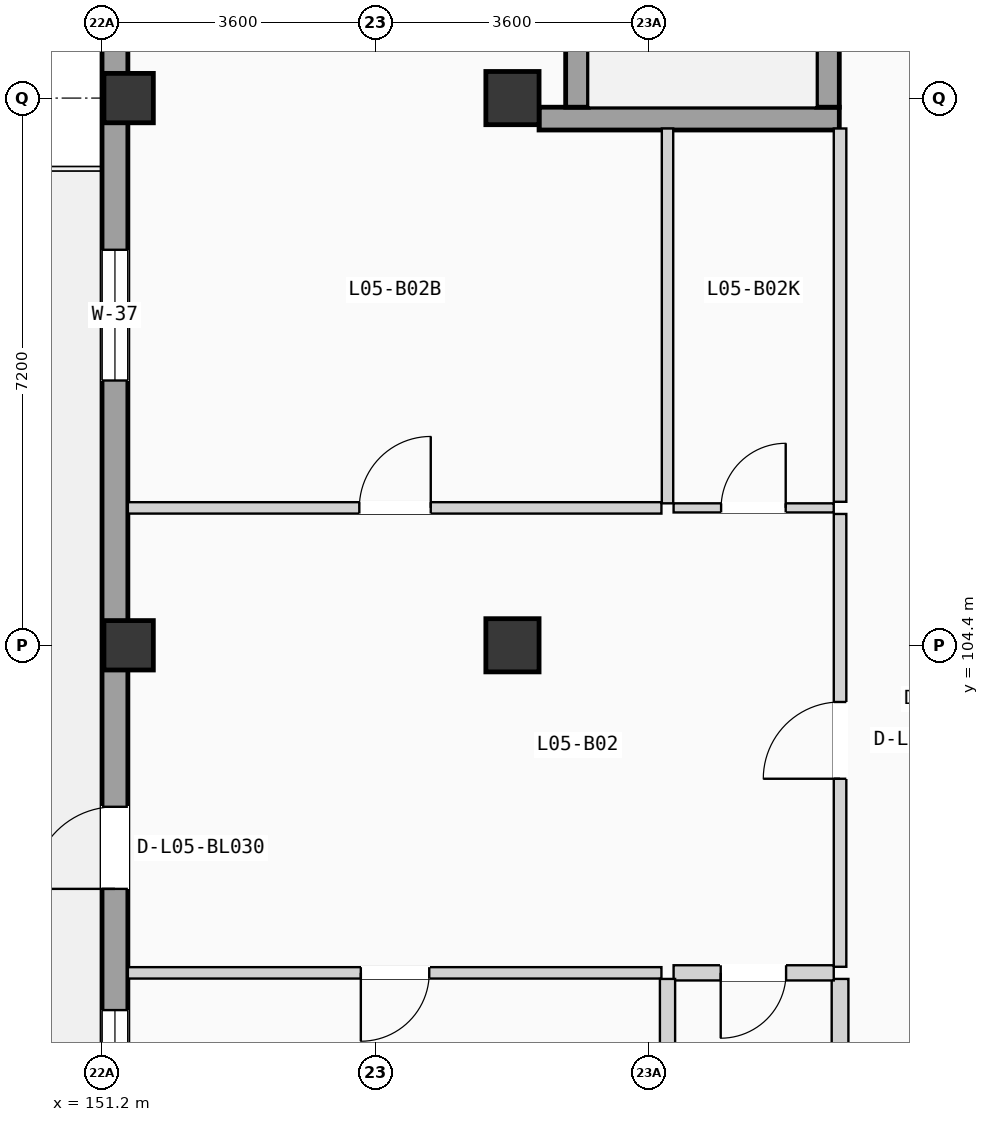
"""IFC4 building model, lengths in metres.
Left out: names, types, materials, properties, quantities, classifications, styles, units other than length and angle.
Written with IfcOpenShell. Run it as: python <this file> out.ifc"""

import sys

from ifc_helpers import new_model, si_unit, direction, frame, frame_2d, origin, origin_2d, place, context, subcontext, project, spatial, rectangle, extrude, element, fill, save


model = new_model("IFC4")
c1 = context("Model", 3, precision=1e-05, world=origin(), true_north=direction((0.0, 1.0)))
c2 = subcontext(c1, "Body", "Model", "MODEL_VIEW")
j1 = project(units=[si_unit("LENGTHUNIT", "METRE"), si_unit("PLANEANGLEUNIT", "RADIAN")], contexts=[c1])
p1 = place(None, origin())
s1 = spatial("IfcSite", under=j1, at=p1, CompositionType="ELEMENT")
p2 = place(p1, origin())
s2 = spatial("IfcBuilding", under=s1, at=p2, CompositionType="ELEMENT")
p3 = place(p2, frame((0.0, 0.0, 18.375)))
s3 = spatial("IfcBuildingStorey", under=s2, at=p3, CompositionType="ELEMENT", Elevation=18.375)
for number, where, z_axis, x_axis in (
    (1, (151.55, 104.4, 0.0), (0.0, 0.0, 1.0), (1.0, 0.0, 0.0)),
    (2, (151.55, 111.6, 0.0), (0.0, 0.0, 1.0), (1.0, 0.0, 0.0)),
):
    element("IfcColumn", number, at=place(p3, frame(where, z_axis=z_axis, x_axis=x_axis)), inside=s3, PredefinedType="COLUMN", context=c2, shape_type="SweptSolid", body=[
        extrude(rectangle(XDim=0.65, YDim=0.65, at=origin_2d()), origin(), (0.0, 0.0, 1.0), 3.15),
    ])
for number, where, z_axis, x_axis in (
    (3, (156.6, 104.4, 0.0), (0.0, 0.0, 1.0), (1.0, 0.0, 0.0)),
    (4, (156.6, 111.6, 0.0), (0.0, 0.0, 1.0), (1.0, 0.0, 0.0)),
):
    element("IfcColumn", number, at=place(p3, frame(where, z_axis=z_axis, x_axis=x_axis)), inside=s3, PredefinedType="COLUMN", context=c2, shape_type="SweptSolid", body=[
        extrude(rectangle(XDim=0.7, YDim=0.7, at=origin_2d()), origin(), (0.0, 0.0, 1.0), 3.15),
    ])
p4 = place(p3, frame((151.37, 68.74, 0.0), z_axis=(0.0, 0.0, 1.0), x_axis=(0.0, 1.0, 0.0)))
e5 = element("IfcWall", 5, at=p4, inside=s3, PredefinedType="SOLIDWALL", context=c2, shape_type="SweptSolid", body=[
    extrude(rectangle(XDim=49.72, YDim=0.34, at=frame_2d((24.86, 0.0))), origin(), (0.0, 0.0, 1.0), 2.89),
])
p5 = place(p4, frame((16.36, 0.0, 0.0)))
e6 = element("IfcOpeningElement", 6, at=p5, cuts=e5, PredefinedType="OPENING", context=c2, shape_type="SweptSolid", body=[
    extrude(rectangle(XDim=0.95, YDim=2.15, at=frame_2d((0.475, 1.075))), frame((0.0, 0.18, 0.0), z_axis=(0.0, -1.0, 0.0), x_axis=(1.0, 0.0, 0.0)), (0.0, 0.0, 1.0), 0.36),
])
p6 = place(p4, frame((9.353, 0.0, 0.555)))
e7 = element("IfcOpeningElement", 7, at=p6, cuts=e5, PredefinedType="OPENING", context=c2, shape_type="SweptSolid", body=[
    extrude(rectangle(XDim=1.6, YDim=1.65, at=frame_2d((0.8, 0.825))), frame((0.0, 0.18, 0.0), z_axis=(0.0, -1.0, 0.0), x_axis=(1.0, 0.0, 0.0)), (0.0, 0.0, 1.0), 0.36),
])
p7 = place(p4, frame((23.379, 0.0, 0.85)))
e8 = element("IfcOpeningElement", 8, at=p7, cuts=e5, PredefinedType="OPENING", context=c2, shape_type="SweptSolid", body=[
    extrude(rectangle(XDim=0.95, YDim=1.2, at=frame_2d((0.475, 0.6))), frame((0.0, 0.18, 0.0), z_axis=(0.0, -1.0, 0.0), x_axis=(1.0, 0.0, 0.0)), (0.0, 0.0, 1.0), 0.36),
])
p8 = place(p4, frame((32.455, 0.0, 0.0)))
e9 = element("IfcOpeningElement", 9, at=p8, cuts=e5, PredefinedType="OPENING", context=c2, shape_type="SweptSolid", body=[
    extrude(rectangle(XDim=1.08, YDim=2.18, at=frame_2d((0.54, 1.09))), frame((0.0, 0.18, 0.0), z_axis=(0.0, -1.0, 0.0), x_axis=(1.0, 0.0, 0.0)), (0.0, 0.0, 1.0), 0.36),
])
p9 = place(p4, frame((29.14, 0.0, 0.9)))
e10 = element("IfcOpeningElement", 10, at=p9, cuts=e5, PredefinedType="OPENING", context=c2, shape_type="SweptSolid", body=[
    extrude(rectangle(XDim=1.72, YDim=1.2, at=frame_2d((0.86, 0.6))), frame((0.0, 0.18, 0.0), z_axis=(0.0, -1.0, 0.0), x_axis=(1.0, 0.0, 0.0)), (0.0, 0.0, 1.0), 0.36),
])
p10 = place(p4, frame((39.144, 0.0, 0.855)))
e11 = element("IfcOpeningElement", 11, at=p10, cuts=e5, PredefinedType="OPENING", context=c2, shape_type="SweptSolid", body=[
    extrude(rectangle(XDim=1.72, YDim=1.35, at=frame_2d((0.86, 0.675))), frame((0.0, 0.18, 0.0), z_axis=(0.0, -1.0, 0.0), x_axis=(1.0, 0.0, 0.0)), (0.0, 0.0, 1.0), 0.36),
])
p11 = place(p3, frame((156.95, 111.33, 0.0), z_axis=(0.0, 0.0, 1.0), x_axis=(1.0, 0.0, 0.0)))
e12 = element("IfcWall", 12, at=p11, inside=s3, PredefinedType="SHEAR", context=c2, shape_type="SweptSolid", body=[
    extrude(rectangle(XDim=3.95, YDim=0.3, at=frame_2d((1.975, 0.0))), origin(), (0.0, 0.0, 1.0), 2.89),
])
p12 = place(p3, frame((157.45, 111.48, 0.0), z_axis=(0.0, 0.0, 1.0), x_axis=(0.0, 1.0, 0.0)))
e13 = element("IfcWall", 13, at=p12, inside=s3, PredefinedType="SHEAR", context=c2, shape_type="SweptSolid", body=[
    extrude(rectangle(XDim=7.0, YDim=0.3, at=frame_2d((3.5, 0.0))), origin(), (0.0, 0.0, 1.0), 2.89),
])
p13 = place(p3, frame((160.75, 111.48, 0.0), z_axis=(0.0, 0.0, 1.0), x_axis=(0.0, 1.0, 0.0)))
e14 = element("IfcWall", 14, at=p13, inside=s3, PredefinedType="SHEAR", context=c2, shape_type="SweptSolid", body=[
    extrude(rectangle(XDim=7.0, YDim=0.3, at=frame_2d((3.5, 0.0))), origin(), (0.0, 0.0, 1.0), 2.89),
])
p14 = place(p13, frame((5.625, 0.0, 0.0)))
e15 = element("IfcOpeningElement", 15, at=p14, cuts=e14, PredefinedType="OPENING", context=c2, shape_type="SweptSolid", body=[
    extrude(rectangle(XDim=1.15, YDim=2.12, at=frame_2d((0.575, 1.06))), frame((0.0, 0.16, 0.0), z_axis=(0.0, -1.0, 0.0), x_axis=(1.0, 0.0, 0.0)), (0.0, 0.0, 1.0), 0.32),
])
p15 = place(p3, frame((160.91, 100.17, 0.0), z_axis=(0.0, 0.0, 1.0), x_axis=(0.0, 1.0, 0.0)))
e16 = element("IfcWall", 16, at=p15, inside=s3, PredefinedType="PARTITIONING", context=c2, shape_type="SweptSolid", body=[
    extrude(rectangle(XDim=5.958, YDim=0.165, at=frame_2d((2.979, 0.0))), origin(), (0.0, 0.0, 1.0), 2.87),
])
p16 = place(p15, frame((2.474, 0.0, 0.0)))
e17 = element("IfcOpeningElement", 17, at=p16, cuts=e16, PredefinedType="OPENING", context=c2, shape_type="SweptSolid", body=[
    extrude(rectangle(XDim=1.01, YDim=2.11, at=frame_2d((0.505, 1.055))), frame((0.0, 0.093, 0.0), z_axis=(0.0, -1.0, 0.0), x_axis=(1.0, 0.0, 0.0)), (0.0, 0.0, 1.0), 0.185),
])
p17 = place(p3, frame((160.91, 95.098, 0.0), z_axis=(0.0, 0.0, 1.0), x_axis=(0.0, 1.0, 0.0)))
e18 = element("IfcWall", 18, at=p17, inside=s3, PredefinedType="PLUMBINGWALL", context=c2, shape_type="SweptSolid", body=[
    extrude(rectangle(XDim=4.912, YDim=0.22, at=frame_2d((2.456, 0.0))), origin(), (0.0, 0.0, 1.0), 2.87),
])
p18 = place(p3, frame((160.91, 106.288, 0.0), z_axis=(0.0, 0.0, 1.0), x_axis=(0.0, 1.0, 0.0)))
e19 = element("IfcWall", 19, at=p18, inside=s3, PredefinedType="PARTITIONING", context=c2, shape_type="SweptSolid", body=[
    extrude(rectangle(XDim=4.912, YDim=0.165, at=frame_2d((2.456, 0.0))), origin(), (0.0, 0.0, 1.0), 2.87),
])
p19 = place(p3, frame((158.72, 100.09, 0.0), z_axis=(0.0, 0.0, 1.0), x_axis=(1.0, 0.0, 0.0)))
e20 = element("IfcWall", 20, at=p19, inside=s3, PredefinedType="PLUMBINGWALL", context=c2, shape_type="SweptSolid", body=[
    extrude(rectangle(XDim=2.107, YDim=0.2, at=frame_2d((1.053, 0.0))), origin(), (0.0, 0.0, 1.0), 2.87),
])
p20 = place(p19, frame((0.62, 0.0, 0.0)))
e21 = element("IfcOpeningElement", 21, at=p20, cuts=e20, PredefinedType="OPENING", context=c2, shape_type="SweptSolid", body=[
    extrude(rectangle(XDim=0.86, YDim=2.0, at=frame_2d((0.43, 1.0))), frame((0.0, 0.11, 0.0), z_axis=(0.0, -1.0, 0.0), x_axis=(1.0, 0.0, 0.0)), (0.0, 0.0, 1.0), 0.22),
])
p21 = place(p3, frame((158.72, 106.208, 0.0), z_axis=(0.0, 0.0, 1.0), x_axis=(1.0, 0.0, 0.0)))
e22 = element("IfcWall", 22, at=p21, inside=s3, PredefinedType="PARTITIONING", context=c2, shape_type="SweptSolid", body=[
    extrude(rectangle(XDim=2.107, YDim=0.12, at=frame_2d((1.053, 0.0))), origin(), (0.0, 0.0, 1.0), 2.87),
])
p22 = place(p21, frame((0.625, 0.0, 0.0)))
e23 = element("IfcOpeningElement", 23, at=p22, cuts=e22, PredefinedType="OPENING", context=c2, shape_type="SweptSolid", body=[
    extrude(rectangle(XDim=0.85, YDim=2.01, at=frame_2d((0.425, 1.005))), frame((0.0, 0.07, 0.0), z_axis=(0.0, -1.0, 0.0), x_axis=(1.0, 0.0, 0.0)), (0.0, 0.0, 1.0), 0.14),
])
p23 = place(p3, frame((151.54, 100.09, 0.0), z_axis=(0.0, 0.0, 1.0), x_axis=(1.0, 0.0, 0.0)))
e24 = element("IfcWall", 24, at=p23, inside=s3, PredefinedType="PARTITIONING", context=c2, shape_type="SweptSolid", body=[
    extrude(rectangle(XDim=7.02, YDim=0.15, at=frame_2d((3.51, 0.0))), origin(), (0.0, 0.0, 1.0), 2.87),
])
p24 = place(p23, frame((3.065, 0.0, 0.0)))
e25 = element("IfcOpeningElement", 25, at=p24, cuts=e24, PredefinedType="OPENING", context=c2, shape_type="SweptSolid", body=[
    extrude(rectangle(XDim=0.9, YDim=2.04, at=frame_2d((0.45, 1.02))), frame((0.0, 0.085, 0.0), z_axis=(0.0, -1.0, 0.0), x_axis=(1.0, 0.0, 0.0)), (0.0, 0.0, 1.0), 0.17),
])
p25 = place(p3, frame((151.54, 106.208, 0.0), z_axis=(0.0, 0.0, 1.0), x_axis=(1.0, 0.0, 0.0)))
e26 = element("IfcWall", 26, at=p25, inside=s3, PredefinedType="PARTITIONING", context=c2, shape_type="SweptSolid", body=[
    extrude(rectangle(XDim=7.02, YDim=0.15, at=frame_2d((3.51, 0.0))), origin(), (0.0, 0.0, 1.0), 2.87),
])
p26 = place(p25, frame((3.045, 0.0, 0.0)))
e27 = element("IfcOpeningElement", 27, at=p26, cuts=e26, PredefinedType="OPENING", context=c2, shape_type="SweptSolid", body=[
    extrude(rectangle(XDim=0.94, YDim=2.06, at=frame_2d((0.47, 1.03))), frame((0.0, 0.085, 0.0), z_axis=(0.0, -1.0, 0.0), x_axis=(1.0, 0.0, 0.0)), (0.0, 0.0, 1.0), 0.17),
])
p27 = place(p3, frame((158.64, 95.098, 0.0), z_axis=(0.0, 0.0, 1.0), x_axis=(0.0, 1.0, 0.0)))
e28 = element("IfcWall", 28, at=p27, inside=s3, PredefinedType="PLUMBINGWALL", context=c2, shape_type="SweptSolid", body=[
    extrude(rectangle(XDim=4.912, YDim=0.2, at=frame_2d((2.456, 0.0))), origin(), (0.0, 0.0, 1.0), 2.87),
])
p28 = place(p3, frame((158.64, 106.268, 0.0), z_axis=(0.0, 0.0, 1.0), x_axis=(0.0, 1.0, 0.0)))
e29 = element("IfcWall", 29, at=p28, inside=s3, PredefinedType="PARTITIONING", context=c2, shape_type="SweptSolid", body=[
    extrude(rectangle(XDim=4.932, YDim=0.15, at=frame_2d((2.466, 0.0))), origin(), (0.0, 0.0, 1.0), 2.87),
])
p29 = place(p8, origin())
e30 = element("IfcDoor", 30, at=p29, inside=s3, OperationType="SINGLE_SWING_LEFT", PredefinedType="DOOR", context=c2, shape_type="SweptSolid", body=[
    extrude(rectangle(XDim=1.08, YDim=2.18, at=frame_2d((0.54, 1.09))), frame((0.0, 0.025, 0.0), z_axis=(0.0, -1.0, 0.0), x_axis=(1.0, 0.0, 0.0)), (0.0, 0.0, 1.0), 0.05),
])
fill(e9, e30)
p30 = place(p9, origin())
e31 = element("IfcWindow", 31, at=p30, inside=s3, PartitioningType="DOUBLE_PANEL_VERTICAL", PredefinedType="WINDOW", context=c2, shape_type="SweptSolid", body=[
    extrude(rectangle(XDim=1.72, YDim=1.2, at=frame_2d((0.86, 0.6))), frame((0.0, 0.03, 0.0), z_axis=(0.0, -1.0, 0.0), x_axis=(1.0, 0.0, 0.0)), (0.0, 0.0, 1.0), 0.06),
])
fill(e10, e31)
p31 = place(p10, origin())
e32 = element("IfcWindow", 32, at=p31, inside=s3, PartitioningType="DOUBLE_PANEL_VERTICAL", PredefinedType="WINDOW", context=c2, shape_type="SweptSolid", body=[
    extrude(rectangle(XDim=1.72, YDim=1.35, at=frame_2d((0.86, 0.675))), frame((0.0, 0.03, 0.0), z_axis=(0.0, -1.0, 0.0), x_axis=(1.0, 0.0, 0.0)), (0.0, 0.0, 1.0), 0.06),
])
fill(e11, e32)
p32 = place(p16, origin())
e33 = element("IfcDoor", 33, at=p32, inside=s3, OperationType="SINGLE_SWING_LEFT", PredefinedType="DOOR", context=c2, shape_type="SweptSolid", body=[
    extrude(rectangle(XDim=1.01, YDim=2.11, at=frame_2d((0.505, 1.055))), frame((0.0, 0.025, 0.0), z_axis=(0.0, -1.0, 0.0), x_axis=(1.0, 0.0, 0.0)), (0.0, 0.0, 1.0), 0.05),
])
fill(e17, e33)
p33 = place(p20, frame((0.86, 0.0, 0.0), z_axis=(0.0, 0.0, 1.0), x_axis=(-1.0, 0.0, 0.0)))
e34 = element("IfcDoor", 34, at=p33, inside=s3, OperationType="SINGLE_SWING_LEFT", PredefinedType="DOOR", context=c2, shape_type="SweptSolid", body=[
    extrude(rectangle(XDim=0.86, YDim=2.0, at=frame_2d((0.43, 1.0))), frame((0.0, 0.025, 0.0), z_axis=(0.0, -1.0, 0.0), x_axis=(1.0, 0.0, 0.0)), (0.0, 0.0, 1.0), 0.05),
])
fill(e21, e34)
p34 = place(p22, origin())
e35 = element("IfcDoor", 35, at=p34, inside=s3, OperationType="SINGLE_SWING_RIGHT", PredefinedType="DOOR", context=c2, shape_type="SweptSolid", body=[
    extrude(rectangle(XDim=0.85, YDim=2.01, at=frame_2d((0.425, 1.005))), frame((0.0, 0.025, 0.0), z_axis=(0.0, -1.0, 0.0), x_axis=(1.0, 0.0, 0.0)), (0.0, 0.0, 1.0), 0.05),
])
fill(e23, e35)
p35 = place(p24, frame((0.9, 0.0, 0.0), z_axis=(0.0, 0.0, 1.0), x_axis=(-1.0, 0.0, 0.0)))
e36 = element("IfcDoor", 36, at=p35, inside=s3, OperationType="SINGLE_SWING_LEFT", PredefinedType="DOOR", context=c2, shape_type="SweptSolid", body=[
    extrude(rectangle(XDim=0.9, YDim=2.04, at=frame_2d((0.45, 1.02))), frame((0.0, 0.025, 0.0), z_axis=(0.0, -1.0, 0.0), x_axis=(1.0, 0.0, 0.0)), (0.0, 0.0, 1.0), 0.05),
])
fill(e25, e36)
p36 = place(p26, origin())
e37 = element("IfcDoor", 37, at=p36, inside=s3, OperationType="SINGLE_SWING_RIGHT", PredefinedType="DOOR", context=c2, shape_type="SweptSolid", body=[
    extrude(rectangle(XDim=0.94, YDim=2.06, at=frame_2d((0.47, 1.03))), frame((0.0, 0.025, 0.0), z_axis=(0.0, -1.0, 0.0), x_axis=(1.0, 0.0, 0.0)), (0.0, 0.0, 1.0), 0.05),
])
fill(e27, e37)
save(model, sys.argv[1])
